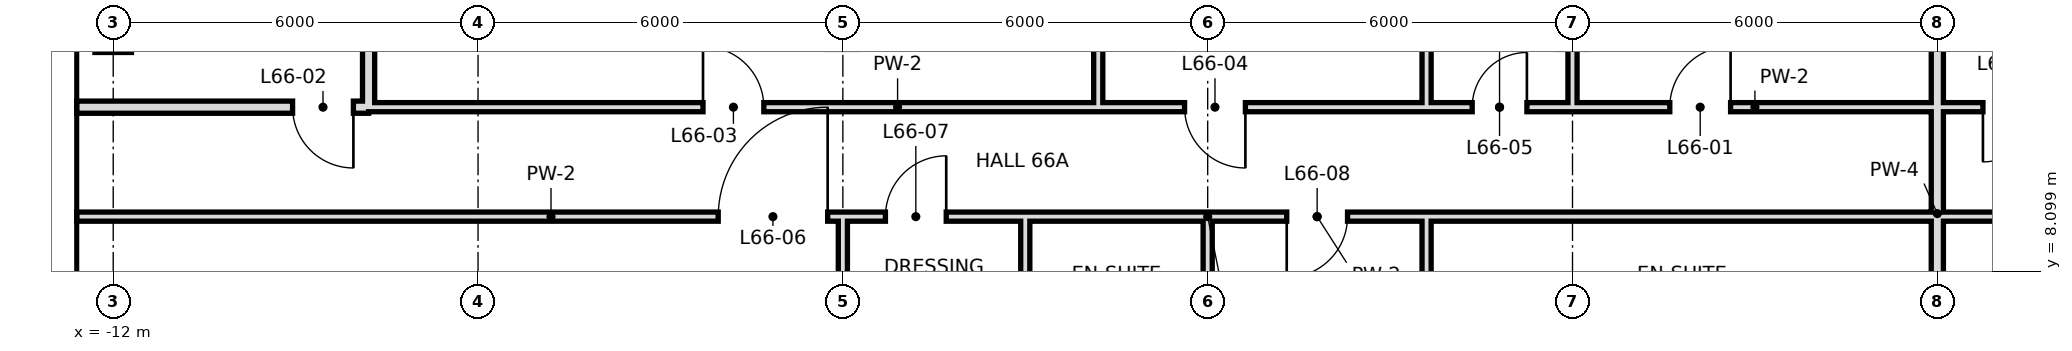
"""IFC4 building model, lengths in metres.
Left out: names, types, materials, properties, quantities, classifications, styles, units other than length and angle.
Written with IfcOpenShell. Run it as: python <this file> out.ifc"""

import sys

from ifc_helpers import new_model, si_unit, direction, frame, frame_2d, origin, place, context, subcontext, project, spatial, rectangle, extrude, element, fill, save


model = new_model("IFC4")
c1 = context("Model", 3, precision=1e-05, world=origin(), true_north=direction((0.0, 1.0)))
c2 = subcontext(c1, "Body", "Model", "MODEL_VIEW")
j1 = project(units=[si_unit("LENGTHUNIT", "METRE"), si_unit("PLANEANGLEUNIT", "RADIAN")], contexts=[c1])
p1 = place(None, origin())
s1 = spatial("IfcSite", under=j1, at=p1, CompositionType="ELEMENT")
p2 = place(p1, origin())
s2 = spatial("IfcBuilding", under=s1, at=p2, CompositionType="ELEMENT")
p3 = place(p2, frame((0.0, 0.0, 277.4)))
s3 = spatial("IfcBuildingStorey", under=s2, at=p3, CompositionType="ELEMENT", Elevation=277.4)
p4 = place(p3, frame((-7.8, 10.8, 0.0), z_axis=(0.0, 0.0, 1.0), x_axis=(0.0, 1.0, 0.0)))
e1 = element("IfcWall", 1, at=p4, inside=s3, PredefinedType="SOLIDWALL", context=c2, shape_type="SweptSolid", body=[
    extrude(rectangle(XDim=7.2, YDim=0.2, at=frame_2d((3.6, 0.0))), origin(), (0.0, 0.0, 1.0), 3.4),
])
p5 = place(p3, frame((0.0, 0.0, 0.0), z_axis=(0.0, 0.0, 1.0), x_axis=(0.0, 1.0, 0.0)))
e2 = element("IfcWall", 2, at=p5, inside=s3, PredefinedType="PARTITIONING", context=c2, shape_type="SweptSolid", body=[
    extrude(rectangle(XDim=9.0, YDim=0.15, at=frame_2d((4.5, 0.0))), origin(), (0.0, 0.0, 1.0), 3.4),
])
p6 = place(p3, frame((12.0, 10.8, 0.0), z_axis=(0.0, 0.0, 1.0), x_axis=(0.0, 1.0, 0.0)))
e3 = element("IfcWall", 3, at=p6, inside=s3, PredefinedType="PARTITIONING", context=c2, shape_type="SweptSolid", body=[
    extrude(rectangle(XDim=7.9, YDim=0.15, at=frame_2d((3.95, 0.0))), origin(), (0.0, 0.0, 1.0), 3.4),
])
p7 = place(p3, frame((18.0, -0.6, 0.0), z_axis=(0.0, 0.0, 1.0), x_axis=(0.0, 1.0, 0.0)))
e4 = element("IfcWall", 4, at=p7, inside=s3, PredefinedType="SOLIDWALL", context=c2, shape_type="SweptSolid", body=[
    extrude(rectangle(XDim=19.3, YDim=0.2, at=frame_2d((9.65, 0.0))), origin(), (0.0, 0.0, 1.0), 3.4),
])
p8 = place(p3, frame((3.0, 6.0, 0.0), z_axis=(0.0, 0.0, 1.0), x_axis=(0.0, 1.0, 0.0)))
e5 = element("IfcWall", 5, at=p8, inside=s3, PredefinedType="PARTITIONING", context=c2, shape_type="SweptSolid", body=[
    extrude(rectangle(XDim=3.0, YDim=0.15, at=frame_2d((1.5, 0.0))), origin(), (0.0, 0.0, 1.0), 4.1),
])
p9 = place(p3, frame((4.2, 10.8, 0.0), z_axis=(0.0, 0.0, 1.0), x_axis=(0.0, 1.0, 0.0)))
e6 = element("IfcWall", 6, at=p9, inside=s3, PredefinedType="PARTITIONING", context=c2, shape_type="SweptSolid", body=[
    extrude(rectangle(XDim=7.9, YDim=0.15, at=frame_2d((3.95, 0.0))), origin(), (0.0, 0.0, 1.0), 4.1),
])
p10 = place(p3, frame((6.0, 6.0, 0.0), z_axis=(0.0, 0.0, 1.0), x_axis=(0.0, 1.0, 0.0)))
e7 = element("IfcWall", 7, at=p10, inside=s3, PredefinedType="PARTITIONING", context=c2, shape_type="SweptSolid", body=[
    extrude(rectangle(XDim=3.0, YDim=0.15, at=frame_2d((1.5, 0.0))), origin(), (0.0, 0.0, 1.0), 3.4),
])
p11 = place(p3, frame((9.6, 6.0, 0.0), z_axis=(0.0, 0.0, 1.0), x_axis=(0.0, 1.0, 0.0)))
e8 = element("IfcWall", 8, at=p11, inside=s3, PredefinedType="PARTITIONING", context=c2, shape_type="SweptSolid", body=[
    extrude(rectangle(XDim=3.0, YDim=0.15, at=frame_2d((1.5, 0.0))), origin(), (0.0, 0.0, 1.0), 4.1),
])
p12 = place(p3, frame((9.6, 10.8, 0.0), z_axis=(0.0, 0.0, 1.0), x_axis=(0.0, 1.0, 0.0)))
e9 = element("IfcWall", 9, at=p12, inside=s3, PredefinedType="PARTITIONING", context=c2, shape_type="SweptSolid", body=[
    extrude(rectangle(XDim=7.9, YDim=0.15, at=frame_2d((3.95, 0.0))), origin(), (0.0, 0.0, 1.0), 4.1),
])
p13 = place(p3, frame((-12.6, 10.8, 0.0), z_axis=(0.0, 0.0, 1.0), x_axis=(1.0, 0.0, 0.0)))
e10 = element("IfcWall", 10, at=p13, inside=s3, PredefinedType="SOLIDWALL", context=c2, shape_type="SweptSolid", body=[
    extrude(rectangle(XDim=4.8, YDim=0.2, at=frame_2d((2.4, 0.0))), origin(), (0.0, 0.0, 1.0), 3.65),
])
p14 = place(p13, frame((3.55, 0.0, 0.0)))
e11 = element("IfcOpeningElement", 11, at=p14, cuts=e10, PredefinedType="OPENING", context=c2, shape_type="SweptSolid", body=[
    extrude(rectangle(XDim=1.0, YDim=2.4, at=frame_2d((0.5, 1.2))), frame((0.0, 0.11, 0.0), z_axis=(0.0, -1.0, 0.0), x_axis=(1.0, 0.0, 0.0)), (0.0, 0.0, 1.0), 0.22),
])
p15 = place(p3, frame((-7.8, 10.8, 0.0), z_axis=(0.0, 0.0, 1.0), x_axis=(1.0, 0.0, 0.0)))
e12 = element("IfcWall", 12, at=p15, inside=s3, PredefinedType="PARTITIONING", context=c2, shape_type="SweptSolid", body=[
    extrude(rectangle(XDim=17.4, YDim=0.15, at=frame_2d((8.7, 0.0))), origin(), (0.0, 0.0, 1.0), 4.1),
])
p16 = place(p15, frame((5.5, 0.0, 0.0)))
e13 = element("IfcOpeningElement", 13, at=p16, cuts=e12, PredefinedType="OPENING", context=c2, shape_type="SweptSolid", body=[
    extrude(rectangle(XDim=1.0, YDim=2.4, at=frame_2d((0.5, 1.2))), frame((0.0, 0.085, 0.0), z_axis=(0.0, -1.0, 0.0), x_axis=(1.0, 0.0, 0.0)), (0.0, 0.0, 1.0), 0.17),
])
p17 = place(p15, frame((13.42, 0.0, 0.0)))
e14 = element("IfcOpeningElement", 14, at=p17, cuts=e12, PredefinedType="OPENING", context=c2, shape_type="SweptSolid", body=[
    extrude(rectangle(XDim=1.0, YDim=2.4, at=frame_2d((0.5, 1.2))), frame((0.0, 0.085, 0.0), z_axis=(0.0, -1.0, 0.0), x_axis=(1.0, 0.0, 0.0)), (0.0, 0.0, 1.0), 0.17),
])
p18 = place(p3, frame((12.0, 10.8, 0.0), z_axis=(0.0, 0.0, 1.0), x_axis=(1.0, 0.0, 0.0)))
e15 = element("IfcWall", 15, at=p18, inside=s3, PredefinedType="PARTITIONING", context=c2, shape_type="SweptSolid", body=[
    extrude(rectangle(XDim=6.0, YDim=0.15, at=frame_2d((3.0, 0.0))), origin(), (0.0, 0.0, 1.0), 4.1),
])
p19 = place(p18, frame((1.6, 0.0, 0.0)))
e16 = element("IfcOpeningElement", 16, at=p19, cuts=e15, PredefinedType="OPENING", context=c2, shape_type="SweptSolid", body=[
    extrude(rectangle(XDim=1.0, YDim=2.4, at=frame_2d((0.5, 1.2))), frame((0.0, 0.085, 0.0), z_axis=(0.0, -1.0, 0.0), x_axis=(1.0, 0.0, 0.0)), (0.0, 0.0, 1.0), 0.17),
])
p20 = place(p3, frame((9.6, 10.8, 0.0), z_axis=(0.0, 0.0, 1.0), x_axis=(1.0, 0.0, 0.0)))
e17 = element("IfcWall", 17, at=p20, inside=s3, PredefinedType="PARTITIONING", context=c2, shape_type="SweptSolid", body=[
    extrude(rectangle(XDim=2.4, YDim=0.15, at=frame_2d((1.2, 0.0))), origin(), (0.0, 0.0, 1.0), 4.1),
])
p21 = place(p20, frame((0.75, 0.0, 0.0)))
e18 = element("IfcOpeningElement", 18, at=p21, cuts=e17, PredefinedType="OPENING", context=c2, shape_type="SweptSolid", body=[
    extrude(rectangle(XDim=0.9, YDim=2.4, at=frame_2d((0.45, 1.2))), frame((0.0, 0.085, 0.0), z_axis=(0.0, -1.0, 0.0), x_axis=(1.0, 0.0, 0.0)), (0.0, 0.0, 1.0), 0.17),
])
p22 = place(p3, frame((18.0, 10.8, 0.0), z_axis=(0.0, 0.0, 1.0), x_axis=(1.0, 0.0, 0.0)))
e19 = element("IfcWall", 19, at=p22, inside=s3, PredefinedType="PARTITIONING", context=c2, shape_type="SweptSolid", body=[
    extrude(rectangle(XDim=2.4, YDim=0.15, at=frame_2d((1.2, 0.0))), origin(), (0.0, 0.0, 1.0), 4.1),
])
p23 = place(p22, frame((0.75, 0.0, 0.0)))
e20 = element("IfcOpeningElement", 20, at=p23, cuts=e19, PredefinedType="OPENING", context=c2, shape_type="SweptSolid", body=[
    extrude(rectangle(XDim=0.9, YDim=2.4, at=frame_2d((0.45, 1.2))), frame((0.0, 0.085, 0.0), z_axis=(0.0, -1.0, 0.0), x_axis=(1.0, 0.0, 0.0)), (0.0, 0.0, 1.0), 0.17),
])
p24 = place(p3, frame((-12.6, 9.0, 0.0), z_axis=(0.0, 0.0, 1.0), x_axis=(1.0, 0.0, 0.0)))
e21 = element("IfcWall", 21, at=p24, inside=s3, PredefinedType="PARTITIONING", context=c2, shape_type="SweptSolid", body=[
    extrude(rectangle(XDim=15.6, YDim=0.15, at=frame_2d((7.8, 0.0))), origin(), (0.0, 0.0, 1.0), 4.1),
])
p25 = place(p24, frame((10.55, 0.0, 0.0)))
e22 = element("IfcOpeningElement", 22, at=p25, cuts=e21, PredefinedType="OPENING", context=c2, shape_type="SweptSolid", body=[
    extrude(rectangle(XDim=1.8, YDim=2.4, at=frame_2d((0.9, 1.2))), frame((0.0, 0.085, 0.0), z_axis=(0.0, -1.0, 0.0), x_axis=(1.0, 0.0, 0.0)), (0.0, 0.0, 1.0), 0.17),
])
p26 = place(p24, frame((13.3, 0.0, 0.0)))
e23 = element("IfcOpeningElement", 23, at=p26, cuts=e21, PredefinedType="OPENING", context=c2, shape_type="SweptSolid", body=[
    extrude(rectangle(XDim=1.0, YDim=2.4, at=frame_2d((0.5, 1.2))), frame((0.0, 0.085, 0.0), z_axis=(0.0, -1.0, 0.0), x_axis=(1.0, 0.0, 0.0)), (0.0, 0.0, 1.0), 0.17),
])
p27 = place(p3, frame((6.0, 9.0, 0.0), z_axis=(0.0, 0.0, 1.0), x_axis=(1.0, 0.0, 0.0)))
e24 = element("IfcWall", 24, at=p27, inside=s3, PredefinedType="PARTITIONING", context=c2, shape_type="SweptSolid", body=[
    extrude(rectangle(XDim=3.6, YDim=0.15, at=frame_2d((1.8, 0.0))), origin(), (0.0, 0.0, 1.0), 4.1),
])
p28 = place(p27, frame((1.3, 0.0, 0.0)))
e25 = element("IfcOpeningElement", 25, at=p28, cuts=e24, PredefinedType="OPENING", context=c2, shape_type="SweptSolid", body=[
    extrude(rectangle(XDim=1.0, YDim=2.4, at=frame_2d((0.5, 1.2))), frame((0.0, 0.085, 0.0), z_axis=(0.0, -1.0, 0.0), x_axis=(1.0, 0.0, 0.0)), (0.0, 0.0, 1.0), 0.17),
])
p29 = place(p3, frame((3.0, 9.0, 0.0), z_axis=(0.0, 0.0, 1.0), x_axis=(1.0, 0.0, 0.0)))
e26 = element("IfcWall", 26, at=p29, inside=s3, PredefinedType="PARTITIONING", context=c2, shape_type="SweptSolid", body=[
    extrude(rectangle(XDim=3.0, YDim=0.15, at=frame_2d((1.5, 0.0))), origin(), (0.0, 0.0, 1.0), 4.1),
])
p30 = place(p3, frame((9.6, 9.0, 0.0), z_axis=(0.0, 0.0, 1.0), x_axis=(1.0, 0.0, 0.0)))
e27 = element("IfcWall", 27, at=p30, inside=s3, PredefinedType="PARTITIONING", context=c2, shape_type="SweptSolid", body=[
    extrude(rectangle(XDim=16.8, YDim=0.15, at=frame_2d((8.4, 0.0))), origin(), (0.0, 0.0, 1.0), 4.1),
])
p31 = place(p19, frame((1.0, 0.0, 0.0), z_axis=(0.0, 0.0, 1.0), x_axis=(-1.0, 0.0, 0.0)))
e28 = element("IfcDoor", 28, at=p31, inside=s3, OperationType="SINGLE_SWING_LEFT", PredefinedType="DOOR", context=c2, shape_type="SweptSolid", body=[
    extrude(rectangle(XDim=1.0, YDim=2.4, at=frame_2d((0.5, 1.2))), frame((0.0, 0.025, 0.0), z_axis=(0.0, -1.0, 0.0), x_axis=(1.0, 0.0, 0.0)), (0.0, 0.0, 1.0), 0.05),
])
fill(e16, e28)
p32 = place(p14, origin())
e29 = element("IfcDoor", 29, at=p32, inside=s3, OperationType="SINGLE_SWING_RIGHT", PredefinedType="DOOR", context=c2, shape_type="SweptSolid", body=[
    extrude(rectangle(XDim=1.0, YDim=2.4, at=frame_2d((0.5, 1.2))), frame((0.0, 0.025, 0.0), z_axis=(0.0, -1.0, 0.0), x_axis=(1.0, 0.0, 0.0)), (0.0, 0.0, 1.0), 0.05),
])
fill(e11, e29)
p33 = place(p16, origin())
e30 = element("IfcDoor", 30, at=p33, inside=s3, OperationType="SINGLE_SWING_LEFT", PredefinedType="DOOR", context=c2, shape_type="SweptSolid", body=[
    extrude(rectangle(XDim=1.0, YDim=2.4, at=frame_2d((0.5, 1.2))), frame((0.0, 0.025, 0.0), z_axis=(0.0, -1.0, 0.0), x_axis=(1.0, 0.0, 0.0)), (0.0, 0.0, 1.0), 0.05),
])
fill(e13, e30)
p34 = place(p17, origin())
e31 = element("IfcDoor", 31, at=p34, inside=s3, OperationType="SINGLE_SWING_RIGHT", PredefinedType="DOOR", context=c2, shape_type="SweptSolid", body=[
    extrude(rectangle(XDim=1.0, YDim=2.4, at=frame_2d((0.5, 1.2))), frame((0.0, 0.025, 0.0), z_axis=(0.0, -1.0, 0.0), x_axis=(1.0, 0.0, 0.0)), (0.0, 0.0, 1.0), 0.05),
])
fill(e14, e31)
p35 = place(p21, frame((0.9, 0.0, 0.0), z_axis=(0.0, 0.0, 1.0), x_axis=(-1.0, 0.0, 0.0)))
e32 = element("IfcDoor", 32, at=p35, inside=s3, OperationType="SINGLE_SWING_LEFT", PredefinedType="DOOR", context=c2, shape_type="SweptSolid", body=[
    extrude(rectangle(XDim=0.9, YDim=2.4, at=frame_2d((0.45, 1.2))), frame((0.0, 0.025, 0.0), z_axis=(0.0, -1.0, 0.0), x_axis=(1.0, 0.0, 0.0)), (0.0, 0.0, 1.0), 0.05),
])
fill(e18, e32)
p36 = place(p25, frame((1.8, 0.0, 0.0), z_axis=(0.0, 0.0, 1.0), x_axis=(-1.0, 0.0, 0.0)))
e33 = element("IfcDoor", 33, at=p36, inside=s3, OperationType="SINGLE_SWING_LEFT", PredefinedType="DOOR", context=c2, shape_type="SweptSolid", body=[
    extrude(rectangle(XDim=1.8, YDim=2.4, at=frame_2d((0.9, 1.2))), frame((0.0, 0.025, 0.0), z_axis=(0.0, -1.0, 0.0), x_axis=(1.0, 0.0, 0.0)), (0.0, 0.0, 1.0), 0.05),
])
fill(e22, e33)
p37 = place(p26, frame((1.0, 0.0, 0.0), z_axis=(0.0, 0.0, 1.0), x_axis=(-1.0, 0.0, 0.0)))
e34 = element("IfcDoor", 34, at=p37, inside=s3, OperationType="SINGLE_SWING_LEFT", PredefinedType="DOOR", context=c2, shape_type="SweptSolid", body=[
    extrude(rectangle(XDim=1.0, YDim=2.4, at=frame_2d((0.5, 1.2))), frame((0.0, 0.025, 0.0), z_axis=(0.0, -1.0, 0.0), x_axis=(1.0, 0.0, 0.0)), (0.0, 0.0, 1.0), 0.05),
])
fill(e23, e34)
p38 = place(p28, frame((1.0, 0.0, 0.0), z_axis=(0.0, 0.0, 1.0), x_axis=(-1.0, 0.0, 0.0)))
e35 = element("IfcDoor", 35, at=p38, inside=s3, OperationType="SINGLE_SWING_RIGHT", PredefinedType="DOOR", context=c2, shape_type="SweptSolid", body=[
    extrude(rectangle(XDim=1.0, YDim=2.4, at=frame_2d((0.5, 1.2))), frame((0.0, 0.025, 0.0), z_axis=(0.0, -1.0, 0.0), x_axis=(1.0, 0.0, 0.0)), (0.0, 0.0, 1.0), 0.05),
])
fill(e25, e35)
p39 = place(p23, frame((0.9, 0.0, 0.0), z_axis=(0.0, 0.0, 1.0), x_axis=(-1.0, 0.0, 0.0)))
e36 = element("IfcDoor", 36, at=p39, inside=s3, OperationType="SINGLE_SWING_RIGHT", PredefinedType="DOOR", context=c2, shape_type="SweptSolid", body=[
    extrude(rectangle(XDim=0.9, YDim=2.4, at=frame_2d((0.45, 1.2))), frame((0.0, 0.025, 0.0), z_axis=(0.0, -1.0, 0.0), x_axis=(1.0, 0.0, 0.0)), (0.0, 0.0, 1.0), 0.05),
])
fill(e20, e36)
save(model, sys.argv[1])
